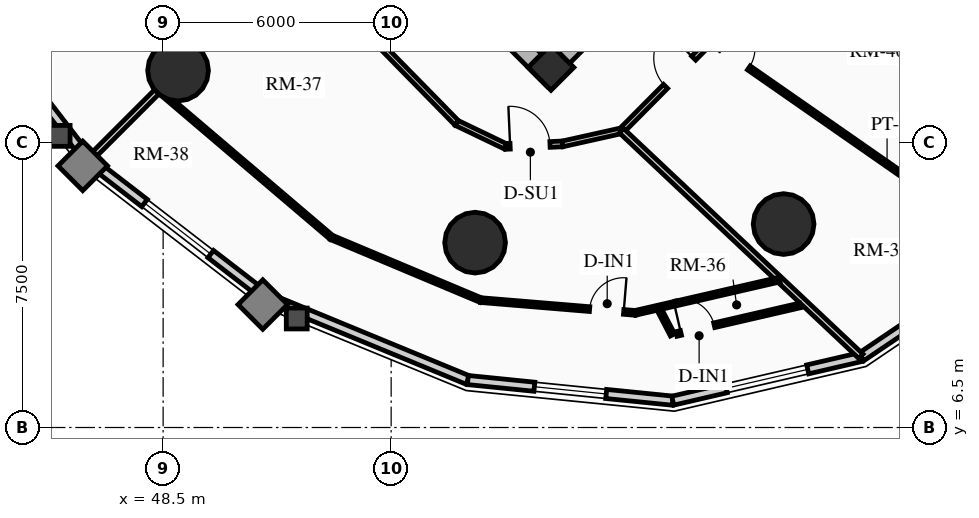
"""IFC4 building model, lengths in metres.
Left out: names, types, materials, properties, quantities, classifications, styles, units other than length and angle.
Written with IfcOpenShell. Run it as: python <this file> out.ifc"""

import sys

from ifc_helpers import new_model, si_unit, direction, frame, frame_2d, origin, origin_2d, place, context, subcontext, project, spatial, rectangle, circle, extrude, source, transform, mapped, element, fill, save


model = new_model("IFC4")
c1 = context("Model", 3, precision=1e-05, world=origin(), true_north=direction((0.0, 1.0)))
c2 = subcontext(c1, "Body", "Model", "MODEL_VIEW")
j1 = project(units=[si_unit("LENGTHUNIT", "METRE"), si_unit("PLANEANGLEUNIT", "RADIAN")], contexts=[c1])
p1 = place(None, origin())
s1 = spatial("IfcSite", under=j1, at=p1, CompositionType="ELEMENT")
p2 = place(p1, origin())
s2 = spatial("IfcBuilding", under=s1, at=p2, CompositionType="ELEMENT")
p3 = place(p2, frame((0.0, 0.0, 39.46)))
s3 = spatial("IfcBuildingStorey", under=s2, at=p3, CompositionType="ELEMENT", Elevation=39.46)
p4 = place(p3, frame((58.773, 15.661, 0.0), z_axis=(0.0, 0.0, 1.0), x_axis=(-0.707106781187, 0.707106781187, 0.0)))
e1 = element("IfcWall", 1, at=p4, inside=s3, PredefinedType="SHEAR", context=c2, shape_type="SweptSolid", body=[
    extrude(rectangle(XDim=14.3, YDim=0.5, at=frame_2d((7.15, 0.0))), origin(), (0.0, 0.0, 1.0), 2.91),
])
p5 = place(p3, frame((58.596, 15.838, 0.0), z_axis=(0.0, 0.0, 1.0), x_axis=(0.707106781187, 0.707106781187, 0.0)))
e2 = element("IfcWall", 2, at=p5, inside=s3, PredefinedType="SHEAR", context=c2, shape_type="SweptSolid", body=[
    extrude(rectangle(XDim=10.7, YDim=0.5, at=frame_2d((5.35, 0.0))), origin(), (0.0, 0.0, 1.0), 2.91),
])
m1 = source(origin(), c2, "Body", "SweptSolid", [
    extrude(rectangle(XDim=1.5, YDim=2.02, at=frame_2d((0.75, 1.01))), frame((0.0, 0.26, 0.0), z_axis=(0.0, -1.0, 0.0), x_axis=(1.0, 0.0, 0.0)), (0.0, 0.0, 1.0), 0.52),
])
p6 = place(p5, frame((5.45, 0.0, 0.0)))
e3 = element("IfcOpeningElement", 3, at=p6, cuts=e2, PredefinedType="OPENING", context=c2, shape_type="MappedRepresentation", body=[
    mapped(m1, transform((0.0, 0.0, 0.0), x_axis=(1.0, 0.0, 0.0), y_axis=(0.0, 1.0, 0.0), z_axis=(0.0, 0.0, 1.0), scale=1.0)),
])
p7 = place(p3, frame((58.706, 15.976, 0.0), z_axis=(0.0, 0.0, 1.0), x_axis=(0.707106781187, 0.707106781187, 0.0)))
e4 = element("IfcColumn", 4, at=p7, inside=s3, PredefinedType="COLUMN", context=c2, shape_type="SweptSolid", body=[
    extrude(rectangle(XDim=0.85, YDim=0.85, at=origin_2d()), origin(), (0.0, 0.0, 1.0), 2.91),
])
for number, where, z_axis, x_axis in (
    (5, (48.893, 15.893, 0.0), (0.0, 0.0, 1.0), (1.0, 0.0, 0.0)),
    (6, (56.709, 11.365, 0.0), (0.0, 0.0, 1.0), (1.0, 0.0, 0.0)),
    (7, (64.827, 11.854, 0.0), (0.0, 0.0, 1.0), (1.0, 0.0, 0.0)),
):
    element("IfcColumn", number, at=place(p3, frame(where, z_axis=z_axis, x_axis=x_axis)), inside=s3, PredefinedType="USERDEFINED", context=c2, shape_type="SweptSolid", body=[
        extrude(circle(Radius=0.8, at=origin_2d()), origin(), (0.0, 0.0, 1.0), 2.91),
    ])
p8 = place(p3, frame((46.541, 13.541, 0.0), z_axis=(0.0, 0.0, 1.0), x_axis=(-0.610494906082, 0.792020182601, 0.0)))
e8 = element("IfcWall", 8, at=p8, inside=s3, PredefinedType="SOLIDWALL", context=c2, shape_type="SweptSolid", body=[
    extrude(rectangle(XDim=5.911, YDim=0.24, at=frame_2d((2.956, 0.0))), origin(), (0.0, 0.0, 1.0), 2.073),
])
p9 = place(p3, frame((51.222, 9.932, 0.0), z_axis=(0.0, 0.0, 1.0), x_axis=(-0.792020182601, 0.610494906082, 0.0)))
e9 = element("IfcWall", 9, at=p9, inside=s3, PredefinedType="SOLIDWALL", context=c2, shape_type="SweptSolid", body=[
    extrude(rectangle(XDim=5.911, YDim=0.24, at=frame_2d((2.956, 0.0))), origin(), (0.0, 0.0, 1.0), 2.073),
])
m2 = source(origin(), c2, "Body", "SweptSolid", [
    extrude(rectangle(XDim=2.2, YDim=1.35, at=frame_2d((1.1, 0.675))), frame((0.0, 0.13, 0.0), z_axis=(0.0, -1.0, 0.0), x_axis=(1.0, 0.0, 0.0)), (0.0, 0.0, 1.0), 0.26),
])
p10 = place(p9, frame((1.855, 0.0, 0.65)))
e10 = element("IfcOpeningElement", 10, at=p10, cuts=e9, PredefinedType="OPENING", context=c2, shape_type="MappedRepresentation", body=[
    mapped(m2, transform((0.0, 0.0, 0.0), x_axis=(1.0, 0.0, 0.0), y_axis=(0.0, 1.0, 0.0), z_axis=(0.0, 0.0, 1.0), scale=1.0)),
])
p11 = place(p3, frame((56.518, 7.749, 0.0), z_axis=(0.0, 0.0, 1.0), x_axis=(-0.924542988536, 0.381077764176, 0.0)))
e11 = element("IfcWall", 11, at=p11, inside=s3, PredefinedType="SOLIDWALL", context=c2, shape_type="SweptSolid", body=[
    extrude(rectangle(XDim=5.728, YDim=0.24, at=frame_2d((2.864, 0.0))), origin(), (0.0, 0.0, 1.0), 2.073),
])
p12 = place(p3, frame((61.91, 7.206, 0.0), z_axis=(0.0, 0.0, 1.0), x_axis=(-0.994968263437, 0.100190592135, 0.0)))
e12 = element("IfcWall", 12, at=p12, inside=s3, PredefinedType="SOLIDWALL", context=c2, shape_type="SweptSolid", body=[
    extrude(rectangle(XDim=5.419, YDim=0.24, at=frame_2d((2.71, 0.0))), origin(), (0.0, 0.0, 1.0), 2.073),
])
m3 = source(origin(), c2, "Body", "SweptSolid", [
    extrude(rectangle(XDim=1.9, YDim=1.35, at=frame_2d((0.95, 0.675))), frame((0.0, 0.13, 0.0), z_axis=(0.0, -1.0, 0.0), x_axis=(1.0, 0.0, 0.0)), (0.0, 0.0, 1.0), 0.26),
])
p13 = place(p12, frame((1.76, 0.0, 0.65)))
e13 = element("IfcOpeningElement", 13, at=p13, cuts=e12, PredefinedType="OPENING", context=c2, shape_type="MappedRepresentation", body=[
    mapped(m3, transform((0.0, 0.0, 0.0), x_axis=(1.0, 0.0, 0.0), y_axis=(0.0, 1.0, 0.0), z_axis=(0.0, 0.0, 1.0), scale=1.0)),
])
p14 = place(p3, frame((66.871, 8.356, 0.0), z_axis=(0.0, 0.0, 1.0), x_axis=(-0.974167686491, -0.22582585901, 0.0)))
e14 = element("IfcWall", 14, at=p14, inside=s3, PredefinedType="SOLIDWALL", context=c2, shape_type="SweptSolid", body=[
    extrude(rectangle(XDim=5.092, YDim=0.24, at=frame_2d((2.546, 0.0))), origin(), (0.0, 0.0, 1.0), 2.073),
])
p15 = place(p14, frame((1.446, 0.0, 0.65)))
e15 = element("IfcOpeningElement", 15, at=p15, cuts=e14, PredefinedType="OPENING", context=c2, shape_type="MappedRepresentation", body=[
    mapped(m2, transform((0.0, 0.0, 0.0), x_axis=(1.0, 0.0, 0.0), y_axis=(0.0, 1.0, 0.0), z_axis=(0.0, 0.0, 1.0), scale=1.0)),
])
p16 = place(p3, frame((70.914, 11.086, 0.0), z_axis=(0.0, 0.0, 1.0), x_axis=(-0.828748297084, -0.559621532896, 0.0)))
e16 = element("IfcWall", 16, at=p16, inside=s3, PredefinedType="SOLIDWALL", context=c2, shape_type="SweptSolid", body=[
    extrude(rectangle(XDim=4.879, YDim=0.24, at=frame_2d((2.439, 0.0))), origin(), (0.0, 0.0, 1.0), 2.073),
])
p17 = place(p3, frame((51.914, 18.914, 0.0), z_axis=(0.0, 0.0, 1.0), x_axis=(0.699999313799, -0.714143515465, 0.0)))
e17 = element("IfcWall", 17, at=p17, inside=s3, PredefinedType="PARTITIONING", context=c2, shape_type="SweptSolid", body=[
    extrude(rectangle(XDim=6.162, YDim=0.15, at=frame_2d((3.081, 0.0))), origin(), (0.0, 0.0, 1.0), 2.159),
])
p18 = place(p3, frame((56.227, 14.513, 0.0), z_axis=(0.0, 0.0, 1.0), x_axis=(0.901477579283, -0.432825801044, 0.0)))
e18 = element("IfcWall", 18, at=p18, inside=s3, PredefinedType="PARTITIONING", context=c2, shape_type="SweptSolid", body=[
    extrude(rectangle(XDim=1.424, YDim=0.15, at=frame_2d((0.712, 0.0))), origin(), (0.0, 0.0, 1.0), 2.205),
])
p19 = place(p3, frame((57.511, 13.897, 0.0), z_axis=(0.0, 0.0, 1.0), x_axis=(0.999024538494, 0.044158481476, 0.0)))
e19 = element("IfcWall", 19, at=p19, inside=s3, PredefinedType="PARTITIONING", context=c2, shape_type="SweptSolid", body=[
    extrude(rectangle(XDim=1.498, YDim=0.15, at=frame_2d((0.749, 0.0))), origin(), (0.0, 0.0, 1.0), 2.159),
])
m4 = source(origin(), c2, "Body", "SweptSolid", [
    extrude(rectangle(XDim=1.05, YDim=2.015, at=frame_2d((0.525, 1.007))), frame((0.0, 0.085, 0.0), z_axis=(0.0, -1.0, 0.0), x_axis=(1.0, 0.0, 0.0)), (0.0, 0.0, 1.0), 0.17),
])
p20 = place(p19, frame((0.12, 0.0, 0.0)))
e20 = element("IfcOpeningElement", 20, at=p20, cuts=e19, PredefinedType="OPENING", context=c2, shape_type="MappedRepresentation", body=[
    mapped(m4, transform((0.0, 0.0, 0.0), x_axis=(1.0, 0.0, 0.0), y_axis=(0.0, 1.0, 0.0), z_axis=(0.0, 0.0, 1.0), scale=1.0)),
])
p21 = place(p3, frame((59.008, 13.963, 0.0), z_axis=(0.0, 0.0, 1.0), x_axis=(0.976020856791, 0.21767702476, 0.0)))
e21 = element("IfcWall", 21, at=p21, inside=s3, PredefinedType="PARTITIONING", context=c2, shape_type="SweptSolid", body=[
    extrude(rectangle(XDim=1.593, YDim=0.15, at=frame_2d((0.796, 0.0))), origin(), (0.0, 0.0, 1.0), 2.205),
])
p22 = place(p3, frame((60.562, 14.31, 0.0), z_axis=(0.0, 0.0, 1.0), x_axis=(0.704566236161, 0.709638230975, 0.0)))
e22 = element("IfcWall", 22, at=p22, inside=s3, PredefinedType="PARTITIONING", context=c2, shape_type="SweptSolid", body=[
    extrude(rectangle(XDim=3.321, YDim=0.15, at=frame_2d((1.661, 0.0))), origin(), (0.0, 0.0, 1.0), 2.159),
])
p23 = place(p22, frame((1.643, 0.0, 0.0)))
e23 = element("IfcOpeningElement", 23, at=p23, cuts=e22, PredefinedType="OPENING", context=c2, shape_type="MappedRepresentation", body=[
    mapped(m4, transform((0.0, 0.0, 0.0), x_axis=(1.0, 0.0, 0.0), y_axis=(0.0, 1.0, 0.0), z_axis=(0.0, 0.0, 1.0), scale=1.0)),
])
p24 = place(p3, frame((51.914, 18.914, 0.0), z_axis=(0.0, 0.0, 1.0), x_axis=(-0.707106781187, -0.707106781187, 0.0)))
e24 = element("IfcWall", 24, at=p24, inside=s3, PredefinedType="PARTITIONING", context=c2, shape_type="SweptSolid", body=[
    extrude(rectangle(XDim=7.579, YDim=0.16, at=frame_2d((3.79, 0.0))), origin(), (0.0, 0.0, 1.0), 2.073),
])
p25 = place(p3, frame((60.562, 14.31, 0.0), z_axis=(0.0, 0.0, 1.0), x_axis=(0.727781661561, -0.685808904211, 0.0)))
e25 = element("IfcWall", 25, at=p25, inside=s3, PredefinedType="PARTITIONING", context=c2, shape_type="SweptSolid", body=[
    extrude(rectangle(XDim=8.655, YDim=0.16, at=frame_2d((4.328, 0.0))), origin(), (0.0, 0.0, 1.0), 2.073),
])
p26 = place(p3, frame((67.435, 21.521, 0.0), z_axis=(0.0, 0.0, 1.0), x_axis=(0.6962628802, -0.717786877601, 0.0)))
e26 = element("IfcWall", 26, at=p26, inside=s3, PredefinedType="PARTITIONING", context=c2, shape_type="SweptSolid", body=[
    extrude(rectangle(XDim=8.893, YDim=0.16, at=frame_2d((4.446, 0.0))), origin(), (0.0, 0.0, 1.0), 2.073),
])
p27 = place(p3, frame((48.377, 15.377, 0.0), z_axis=(0.0, 0.0, 1.0), x_axis=(0.761505943152, -0.648157927163, 0.0)))
e27 = element("IfcWall", 27, at=p27, inside=s3, PredefinedType="PARTITIONING", context=c2, shape_type="SweptSolid", body=[
    extrude(rectangle(XDim=5.979, YDim=0.125, at=frame_2d((2.99, 0.0))), origin(), (0.0, 0.0, 1.0), 2.635),
])
p28 = place(p3, frame((52.93, 11.501, 0.0), z_axis=(0.0, 0.0, 1.0), x_axis=(0.922051248037, -0.387067818338, 0.0)))
e28 = element("IfcWall", 28, at=p28, inside=s3, PredefinedType="PARTITIONING", context=c2, shape_type="SweptSolid", body=[
    extrude(rectangle(XDim=4.26, YDim=0.125, at=frame_2d((2.13, 0.0))), origin(), (0.0, 0.0, 1.0), 2.159),
])
p29 = place(p3, frame((56.858, 9.852, 0.0), z_axis=(0.0, 0.0, 1.0), x_axis=(0.996604967548, -0.082331881181, 0.0)))
e29 = element("IfcWall", 29, at=p29, inside=s3, PredefinedType="PARTITIONING", context=c2, shape_type="SweptSolid", body=[
    extrude(rectangle(XDim=4.077, YDim=0.125, at=frame_2d((2.039, 0.0))), origin(), (0.0, 0.0, 1.0), 2.635),
])
m5 = source(origin(), c2, "Body", "SweptSolid", [
    extrude(rectangle(XDim=0.9, YDim=2.005, at=frame_2d((0.45, 1.002))), frame((0.0, 0.073, 0.0), z_axis=(0.0, -1.0, 0.0), x_axis=(1.0, 0.0, 0.0)), (0.0, 0.0, 1.0), 0.145),
])
p30 = place(p29, frame((2.874, 0.0, 0.0)))
e30 = element("IfcOpeningElement", 30, at=p30, cuts=e29, PredefinedType="OPENING", context=c2, shape_type="MappedRepresentation", body=[
    mapped(m5, transform((0.0, 0.0, 0.0), x_axis=(1.0, 0.0, 0.0), y_axis=(0.0, 1.0, 0.0), z_axis=(0.0, 0.0, 1.0), scale=1.0)),
])
p31 = place(p3, frame((60.921, 9.517, 0.0), z_axis=(0.0, 0.0, 1.0), x_axis=(0.974453436038, 0.224589627973, 0.0)))
e31 = element("IfcWall", 31, at=p31, inside=s3, PredefinedType="PARTITIONING", context=c2, shape_type="SweptSolid", body=[
    extrude(rectangle(XDim=3.898, YDim=0.125, at=frame_2d((1.949, 0.0))), origin(), (0.0, 0.0, 1.0), 2.205),
])
p32 = place(p3, frame((61.564, 9.589, 0.0), z_axis=(0.0, 0.0, 1.0), x_axis=(0.462168536246, -0.886792108729, 0.0)))
e32 = element("IfcWall", 32, at=p32, inside=s3, PredefinedType="PARTITIONING", context=c2, shape_type="SweptSolid", body=[
    extrude(rectangle(XDim=0.735, YDim=0.125, at=frame_2d((0.367, 0.0))), origin(), (0.0, 0.0, 1.0), 2.635),
])
p33 = place(p3, frame((62.008, 8.962, 0.0), z_axis=(0.0, 0.0, 1.0), x_axis=(0.974365294983, 0.224971713626, 0.0)))
e33 = element("IfcWall", 33, at=p33, inside=s3, PredefinedType="PARTITIONING", context=c2, shape_type="SweptSolid", body=[
    extrude(rectangle(XDim=3.337, YDim=0.125, at=frame_2d((1.668, 0.0))), origin(), (0.0, 0.0, 1.0), 2.635),
])
p34 = place(p33, frame((0.12, 0.0, 0.0)))
e34 = element("IfcOpeningElement", 34, at=p34, cuts=e33, PredefinedType="OPENING", context=c2, shape_type="MappedRepresentation", body=[
    mapped(m5, transform((0.0, 0.0, 0.0), x_axis=(1.0, 0.0, 0.0), y_axis=(0.0, 1.0, 0.0), z_axis=(0.0, 0.0, 1.0), scale=1.0)),
])
p35 = place(p3, frame((62.903, 16.667, 0.0), z_axis=(0.0, 0.0, 1.0), x_axis=(0.820761665638, -0.571270766116, 0.0)))
e35 = element("IfcWall", 35, at=p35, inside=s3, PredefinedType="PARTITIONING", context=c2, shape_type="SweptSolid", body=[
    extrude(rectangle(XDim=9.743, YDim=0.125, at=frame_2d((4.872, 0.0))), origin(), (0.0, 0.0, 1.0), 2.073),
])
p36 = place(p35, frame((0.33, 0.0, 0.0)))
e36 = element("IfcOpeningElement", 36, at=p36, cuts=e35, PredefinedType="OPENING", context=c2, shape_type="MappedRepresentation", body=[
    mapped(m5, transform((0.0, 0.0, 0.0), x_axis=(1.0, 0.0, 0.0), y_axis=(0.0, 1.0, 0.0), z_axis=(0.0, 0.0, 1.0), scale=1.0)),
])
m6 = source(origin(), c2, "Body", "SweptSolid", [
    extrude(rectangle(XDim=2.2, YDim=1.35, at=frame_2d((1.1, 0.675))), frame((0.0, 0.03, 0.0), z_axis=(0.0, -1.0, 0.0), x_axis=(1.0, 0.0, 0.0)), (0.0, 0.0, 1.0), 0.06),
])
p37 = place(p10, origin())
e37 = element("IfcWindow", 37, at=p37, inside=s3, PartitioningType="DOUBLE_PANEL_VERTICAL", PredefinedType="WINDOW", context=c2, shape_type="MappedRepresentation", body=[
    mapped(m6, transform((0.0, 0.0, 0.0), x_axis=(1.0, 0.0, 0.0), y_axis=(0.0, 1.0, 0.0), z_axis=(0.0, 0.0, 1.0), scale=1.0)),
])
fill(e10, e37)
m7 = source(origin(), c2, "Body", "SweptSolid", [
    extrude(rectangle(XDim=1.9, YDim=1.35, at=frame_2d((0.95, 0.675))), frame((0.0, 0.03, 0.0), z_axis=(0.0, -1.0, 0.0), x_axis=(1.0, 0.0, 0.0)), (0.0, 0.0, 1.0), 0.06),
])
p38 = place(p13, origin())
e38 = element("IfcWindow", 38, at=p38, inside=s3, PartitioningType="DOUBLE_PANEL_VERTICAL", PredefinedType="WINDOW", context=c2, shape_type="MappedRepresentation", body=[
    mapped(m7, transform((0.0, 0.0, 0.0), x_axis=(1.0, 0.0, 0.0), y_axis=(0.0, 1.0, 0.0), z_axis=(0.0, 0.0, 1.0), scale=1.0)),
])
fill(e13, e38)
p39 = place(p15, origin())
e39 = element("IfcWindow", 39, at=p39, inside=s3, PartitioningType="DOUBLE_PANEL_VERTICAL", PredefinedType="WINDOW", context=c2, shape_type="MappedRepresentation", body=[
    mapped(m6, transform((0.0, 0.0, 0.0), x_axis=(1.0, 0.0, 0.0), y_axis=(0.0, 1.0, 0.0), z_axis=(0.0, 0.0, 1.0), scale=1.0)),
])
fill(e15, e39)
m8 = source(origin(), c2, "Body", "SweptSolid", [
    extrude(rectangle(XDim=1.05, YDim=2.015, at=frame_2d((0.525, 1.007))), frame((0.0, 0.025, 0.0), z_axis=(0.0, -1.0, 0.0), x_axis=(1.0, 0.0, 0.0)), (0.0, 0.0, 1.0), 0.05),
])
p40 = place(p20, origin())
e40 = element("IfcDoor", 40, at=p40, inside=s3, OperationType="SINGLE_SWING_LEFT", PredefinedType="DOOR", context=c2, shape_type="MappedRepresentation", body=[
    mapped(m8, transform((0.0, 0.0, 0.0), x_axis=(1.0, 0.0, 0.0), y_axis=(0.0, 1.0, 0.0), z_axis=(0.0, 0.0, 1.0), scale=1.0)),
])
fill(e20, e40)
m9 = source(origin(), c2, "Body", "SweptSolid", [
    extrude(rectangle(XDim=0.9, YDim=2.005, at=frame_2d((0.45, 1.002))), frame((0.0, 0.025, 0.0), z_axis=(0.0, -1.0, 0.0), x_axis=(1.0, 0.0, 0.0)), (0.0, 0.0, 1.0), 0.05),
])
p41 = place(p30, origin())
e41 = element("IfcDoor", 41, at=p41, inside=s3, OperationType="SINGLE_SWING_RIGHT", PredefinedType="DOOR", context=c2, shape_type="MappedRepresentation", body=[
    mapped(m9, transform((0.0, 0.0, 0.0), x_axis=(1.0, 0.0, 0.0), y_axis=(0.0, 1.0, 0.0), z_axis=(0.0, 0.0, 1.0), scale=1.0)),
])
fill(e30, e41)
p42 = place(p34, origin())
e42 = element("IfcDoor", 42, at=p42, inside=s3, OperationType="SINGLE_SWING_LEFT", PredefinedType="DOOR", context=c2, shape_type="MappedRepresentation", body=[
    mapped(m9, transform((0.0, 0.0, 0.0), x_axis=(1.0, 0.0, 0.0), y_axis=(0.0, 1.0, 0.0), z_axis=(0.0, 0.0, 1.0), scale=1.0)),
])
fill(e34, e42)
p43 = place(p23, origin())
e43 = element("IfcDoor", 43, at=p43, inside=s3, OperationType="SINGLE_SWING_RIGHT", PredefinedType="DOOR", context=c2, shape_type="MappedRepresentation", body=[
    mapped(m8, transform((0.0, 0.0, 0.0), x_axis=(1.0, 0.0, 0.0), y_axis=(0.0, 1.0, 0.0), z_axis=(0.0, 0.0, 1.0), scale=1.0)),
])
fill(e23, e43)
p44 = place(p36, origin())
e44 = element("IfcDoor", 44, at=p44, inside=s3, OperationType="SINGLE_SWING_LEFT", PredefinedType="DOOR", context=c2, shape_type="MappedRepresentation", body=[
    mapped(m9, transform((0.0, 0.0, 0.0), x_axis=(1.0, 0.0, 0.0), y_axis=(0.0, 1.0, 0.0), z_axis=(0.0, 0.0, 1.0), scale=1.0)),
])
fill(e36, e44)
save(model, sys.argv[1])
